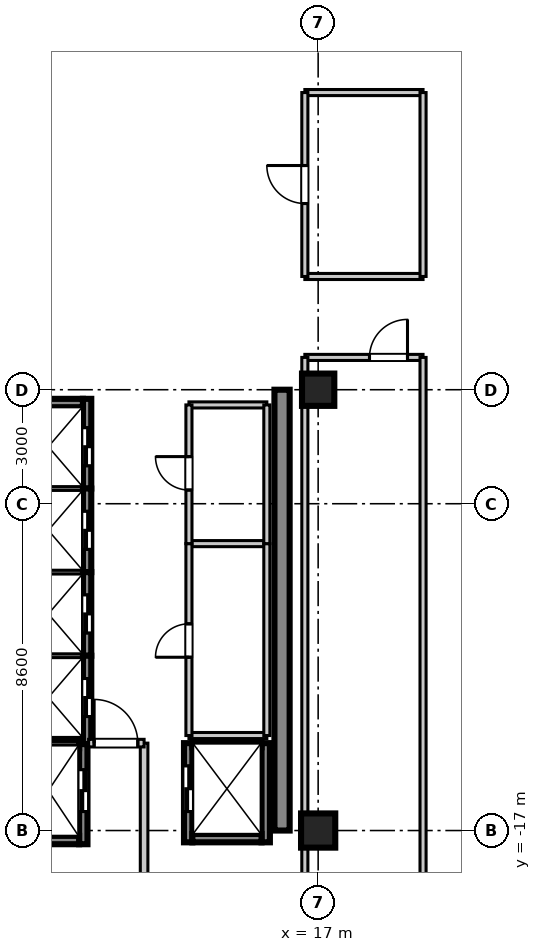
"""IFC4 building model, lengths in metres.
Left out: names, types, materials, properties, quantities, classifications, styles, units other than length and angle.
Written with IfcOpenShell. Run it as: python <this file> out.ifc"""

import sys

from ifc_helpers import new_model, si_unit, direction, frame, frame_2d, origin, origin_2d, place, context, subcontext, project, spatial, rectangle, extrude, source, transform, mapped, element, fill, save


model = new_model("IFC4")
c1 = context("Model", 3, precision=1e-05, world=origin(), true_north=direction((0.0, 1.0)))
c2 = subcontext(c1, "Body", "Model", "MODEL_VIEW")
j1 = project(units=[si_unit("LENGTHUNIT", "METRE"), si_unit("PLANEANGLEUNIT", "RADIAN")], contexts=[c1])
p1 = place(None, origin())
s1 = spatial("IfcSite", under=j1, at=p1, CompositionType="ELEMENT")
p2 = place(p1, origin())
s2 = spatial("IfcBuilding", under=s1, at=p2, CompositionType="ELEMENT")
p3 = place(p2, frame((0.0, 0.0, 281.3)))
s3 = spatial("IfcBuildingStorey", under=s2, at=p3, CompositionType="ELEMENT", Elevation=281.3)
m1 = source(origin(), c2, "Body", "SweptSolid", [
    extrude(rectangle(XDim=0.9, YDim=0.9, at=origin_2d()), origin(), (0.0, 0.0, 1.0), 3.705),
])
p4 = place(p3, frame((17.0, -17.0, 0.0), z_axis=(0.0, 0.0, 1.0), x_axis=(1.0, 0.0, 0.0)))
e1 = element("IfcColumn", 1, at=p4, inside=s3, PredefinedType="COLUMN", context=c2, shape_type="MappedRepresentation", body=[
    mapped(m1, transform((0.0, 0.0, 0.0), scale=1.0)),
])
m2 = source(origin(), c2, "Body", "SweptSolid", [
    extrude(rectangle(XDim=0.85, YDim=0.85, at=origin_2d()), origin(), (0.0, 0.0, 1.0), 3.705),
])
p5 = place(p3, frame((17.0, -5.4, 0.0), z_axis=(0.0, 0.0, 1.0), x_axis=(1.0, 0.0, 0.0)))
e2 = element("IfcColumn", 2, at=p5, inside=s3, PredefinedType="PILASTER", context=c2, shape_type="MappedRepresentation", body=[
    mapped(m2, transform((0.0, 0.0, 0.0), scale=1.0)),
])
m3 = source(origin(), c2, "Body", "SweptSolid", [
    extrude(rectangle(XDim=11.6, YDim=0.4, at=frame_2d((5.8, 0.0))), origin(), (0.0, 0.0, 1.0), 3.45),
])
p6 = place(p3, frame((16.05, -17.0, 0.0), z_axis=(0.0, 0.0, 1.0), x_axis=(0.0, 1.0, 0.0)))
e3 = element("IfcWall", 3, at=p6, inside=s3, PredefinedType="SHEAR", context=c2, shape_type="MappedRepresentation", body=[
    mapped(m3, transform((0.0, 0.0, 0.0), scale=1.0)),
])
m4 = source(origin(), c2, "Body", "SweptSolid", [
    extrude(rectangle(XDim=2.36, YDim=0.22, at=frame_2d((1.18, 0.0))), origin(), (0.0, 0.0, 1.0), 3.45),
])
p7 = place(p3, frame((10.92, -8.0, 0.0), z_axis=(0.0, 0.0, 1.0), x_axis=(0.0, 1.0, 0.0)))
e4 = element("IfcWall", 4, at=p7, inside=s3, PredefinedType="SHEAR", context=c2, shape_type="MappedRepresentation", body=[
    mapped(m4, transform((0.0, 0.0, 0.0), scale=1.0)),
])
p8 = place(p7, frame((0.6, 0.0, 0.0)))
e5 = element("IfcOpeningElement", 5, at=p8, cuts=e4, PredefinedType="OPENING", context=c2, shape_type="SweptSolid", body=[
    extrude(rectangle(XDim=1.0, YDim=2.2, at=frame_2d((0.5, 1.1))), frame((0.0, 0.12, 0.0), z_axis=(0.0, -1.0, 0.0), x_axis=(1.0, 0.0, 0.0)), (0.0, 0.0, 1.0), 0.24),
])
m5 = source(origin(), c2, "Body", "SweptSolid", [
    extrude(rectangle(XDim=1.82, YDim=0.22, at=frame_2d((0.91, 0.0))), origin(), (0.0, 0.0, 1.0), 3.45),
])
p9 = place(p3, frame((8.99, -5.75, 0.0), z_axis=(0.0, 0.0, 1.0), x_axis=(1.0, 0.0, 0.0)))
e6 = element("IfcWall", 6, at=p9, inside=s3, PredefinedType="SHEAR", context=c2, shape_type="MappedRepresentation", body=[
    mapped(m5, transform((0.0, 0.0, 0.0), scale=1.0)),
])
m6 = source(origin(), c2, "Body", "SweptSolid", [
    extrude(rectangle(XDim=2.2, YDim=0.22, at=frame_2d((1.1, 0.0))), origin(), (0.0, 0.0, 1.0), 3.45),
])
p10 = place(p3, frame((10.92, -10.2, 0.0), z_axis=(0.0, 0.0, 1.0), x_axis=(0.0, 1.0, 0.0)))
e7 = element("IfcWall", 7, at=p10, inside=s3, PredefinedType="SHEAR", context=c2, shape_type="MappedRepresentation", body=[
    mapped(m6, transform((0.0, 0.0, 0.0), scale=1.0)),
])
p11 = place(p10, frame((0.6, 0.0, 0.0)))
e8 = element("IfcOpeningElement", 8, at=p11, cuts=e7, PredefinedType="OPENING", context=c2, shape_type="SweptSolid", body=[
    extrude(rectangle(XDim=1.0, YDim=2.2, at=frame_2d((0.5, 1.1))), frame((0.0, 0.12, 0.0), z_axis=(0.0, -1.0, 0.0), x_axis=(1.0, 0.0, 0.0)), (0.0, 0.0, 1.0), 0.24),
])
m7 = source(origin(), c2, "Body", "SweptSolid", [
    extrude(rectangle(XDim=1.82, YDim=0.22, at=frame_2d((0.91, 0.0))), origin(), (0.0, 0.0, 1.0), 3.75),
])
p12 = place(p3, frame((8.99, -8.0, 0.0), z_axis=(0.0, 0.0, 1.0), x_axis=(1.0, 0.0, 0.0)))
e9 = element("IfcWall", 9, at=p12, inside=s3, PredefinedType="SHEAR", context=c2, shape_type="MappedRepresentation", body=[
    mapped(m7, transform((0.0, 0.0, 0.0), scale=1.0)),
])
p13 = place(p3, frame((10.92, -12.4, 0.0), z_axis=(0.0, 0.0, 1.0), x_axis=(0.0, 1.0, 0.0)))
e10 = element("IfcWall", 10, at=p13, inside=s3, PredefinedType="SHEAR", context=c2, shape_type="MappedRepresentation", body=[
    mapped(m6, transform((0.0, 0.0, 0.0), scale=1.0)),
])
p14 = place(p13, frame((0.6, 0.0, 0.0)))
e11 = element("IfcOpeningElement", 11, at=p14, cuts=e10, PredefinedType="OPENING", context=c2, shape_type="SweptSolid", body=[
    extrude(rectangle(XDim=1.0, YDim=2.2, at=frame_2d((0.5, 1.1))), frame((0.0, 0.12, 0.0), z_axis=(0.0, -1.0, 0.0), x_axis=(1.0, 0.0, 0.0)), (0.0, 0.0, 1.0), 0.24),
])
p15 = place(p3, frame((8.99, -10.2, 0.0), z_axis=(0.0, 0.0, 1.0), x_axis=(1.0, 0.0, 0.0)))
e12 = element("IfcWall", 12, at=p15, inside=s3, PredefinedType="SHEAR", context=c2, shape_type="MappedRepresentation", body=[
    mapped(m7, transform((0.0, 0.0, 0.0), scale=1.0)),
])
m8 = source(origin(), c2, "Body", "SweptSolid", [
    extrude(rectangle(XDim=2.325, YDim=0.22, at=frame_2d((1.163, 0.0))), origin(), (0.0, 0.0, 1.0), 3.45),
])
p16 = place(p3, frame((10.92, -14.725, 0.0), z_axis=(0.0, 0.0, 1.0), x_axis=(0.0, 1.0, 0.0)))
e13 = element("IfcWall", 13, at=p16, inside=s3, PredefinedType="SHEAR", context=c2, shape_type="MappedRepresentation", body=[
    mapped(m8, transform((0.0, 0.0, 0.0), scale=1.0)),
])
p17 = place(p16, frame((0.725, 0.0, 0.0)))
e14 = element("IfcOpeningElement", 14, at=p17, cuts=e13, PredefinedType="OPENING", context=c2, shape_type="SweptSolid", body=[
    extrude(rectangle(XDim=1.0, YDim=2.2, at=frame_2d((0.5, 1.1))), frame((0.0, 0.12, 0.0), z_axis=(0.0, -1.0, 0.0), x_axis=(1.0, 0.0, 0.0)), (0.0, 0.0, 1.0), 0.24),
])
p18 = place(p3, frame((8.99, -12.4, 0.0), z_axis=(0.0, 0.0, 1.0), x_axis=(1.0, 0.0, 0.0)))
e15 = element("IfcWall", 15, at=p18, inside=s3, PredefinedType="SHEAR", context=c2, shape_type="MappedRepresentation", body=[
    mapped(m7, transform((0.0, 0.0, 0.0), scale=1.0)),
])
m9 = source(origin(), c2, "Body", "SweptSolid", [
    extrude(rectangle(XDim=2.635, YDim=0.22, at=frame_2d((1.317, 0.0))), origin(), (0.0, 0.0, 1.0), 3.45),
])
p19 = place(p3, frame((10.82, -17.36, 0.0), z_axis=(0.0, 0.0, 1.0), x_axis=(0.0, 1.0, 0.0)))
e16 = element("IfcWall", 16, at=p19, inside=s3, PredefinedType="SHEAR", context=c2, shape_type="MappedRepresentation", body=[
    mapped(m9, transform((0.0, 0.0, 0.0), scale=1.0)),
])
p20 = place(p19, frame((0.86, 0.0, 0.0)))
e17 = element("IfcOpeningElement", 17, at=p20, cuts=e16, PredefinedType="OPENING", context=c2, shape_type="SweptSolid", body=[
    extrude(rectangle(XDim=1.1, YDim=2.2, at=frame_2d((0.55, 1.1))), frame((0.0, 0.12, 0.0), z_axis=(0.0, -1.0, 0.0), x_axis=(1.0, 0.0, 0.0)), (0.0, 0.0, 1.0), 0.24),
])
m10 = source(origin(), c2, "Body", "SweptSolid", [
    extrude(rectangle(XDim=1.62, YDim=0.22, at=frame_2d((0.81, 0.0))), origin(), (0.0, 0.0, 1.0), 3.45),
])
p21 = place(p3, frame((9.09, -17.25, 0.0), z_axis=(0.0, 0.0, 1.0), x_axis=(1.0, 0.0, 0.0)))
e18 = element("IfcWall", 18, at=p21, inside=s3, PredefinedType="SHEAR", context=c2, shape_type="MappedRepresentation", body=[
    mapped(m10, transform((0.0, 0.0, 0.0), scale=1.0)),
])
m11 = source(origin(), c2, "Body", "SweptSolid", [
    extrude(rectangle(XDim=1.62, YDim=0.22, at=frame_2d((0.81, 0.0))), origin(), (0.0, 0.0, 1.0), 3.75),
])
p22 = place(p3, frame((9.09, -14.725, 0.0), z_axis=(0.0, 0.0, 1.0), x_axis=(1.0, 0.0, 0.0)))
e19 = element("IfcWall", 19, at=p22, inside=s3, PredefinedType="SHEAR", context=c2, shape_type="MappedRepresentation", body=[
    mapped(m11, transform((0.0, 0.0, 0.0), scale=1.0)),
])
m12 = source(origin(), c2, "Body", "SweptSolid", [
    extrude(rectangle(XDim=2.61, YDim=0.22, at=frame_2d((1.305, 0.0))), origin(), (0.0, 0.0, 1.0), 3.45),
])
p23 = place(p3, frame((13.58, -17.31, 0.0), z_axis=(0.0, 0.0, 1.0), x_axis=(0.0, 1.0, 0.0)))
e20 = element("IfcWall", 20, at=p23, inside=s3, PredefinedType="SHEAR", context=c2, shape_type="MappedRepresentation", body=[
    mapped(m12, transform((0.0, 0.0, 0.0), scale=1.0)),
])
p24 = place(p23, frame((0.81, 0.0, 0.0)))
e21 = element("IfcOpeningElement", 21, at=p24, cuts=e20, PredefinedType="OPENING", context=c2, shape_type="SweptSolid", body=[
    extrude(rectangle(XDim=1.2, YDim=2.2, at=frame_2d((0.6, 1.1))), frame((0.0, 0.12, 0.0), z_axis=(0.0, -1.0, 0.0), x_axis=(1.0, 0.0, 0.0)), (0.0, 0.0, 1.0), 0.24),
])
p25 = place(p3, frame((15.62, -17.31, 0.0), z_axis=(0.0, 0.0, 1.0), x_axis=(0.0, 1.0, 0.0)))
e22 = element("IfcWall", 22, at=p25, inside=s3, PredefinedType="SHEAR", context=c2, shape_type="MappedRepresentation", body=[
    mapped(m12, transform((0.0, 0.0, 0.0), scale=1.0)),
])
p26 = place(p3, frame((13.69, -17.2, 0.0), z_axis=(0.0, 0.0, 1.0), x_axis=(1.0, 0.0, 0.0)))
e23 = element("IfcWall", 23, at=p26, inside=s3, PredefinedType="SHEAR", context=c2, shape_type="MappedRepresentation", body=[
    mapped(m5, transform((0.0, 0.0, 0.0), scale=1.0)),
])
p27 = place(p3, frame((13.69, -14.7, 0.0), z_axis=(0.0, 0.0, 1.0), x_axis=(1.0, 0.0, 0.0)))
e24 = element("IfcWall", 24, at=p27, inside=s3, PredefinedType="SHEAR", context=c2, shape_type="MappedRepresentation", body=[
    mapped(m7, transform((0.0, 0.0, 0.0), scale=1.0)),
])
m13 = source(origin(), c2, "Body", "SweptSolid", [
    extrude(rectangle(XDim=5.1, YDim=0.2, at=frame_2d((2.55, 0.0))), origin(), (0.0, 0.0, 1.0), 2.79),
])
p28 = place(p3, frame((12.42, -19.8, 0.0), z_axis=(0.0, 0.0, 1.0), x_axis=(0.0, 1.0, 0.0)))
e25 = element("IfcWall", 25, at=p28, inside=s3, PredefinedType="PARTITIONING", context=c2, shape_type="MappedRepresentation", body=[
    mapped(m13, transform((0.0, 0.0, 0.0), scale=1.0)),
])
m14 = source(origin(), c2, "Body", "SweptSolid", [
    extrude(rectangle(XDim=1.46, YDim=0.2, at=frame_2d((0.73, 0.0))), origin(), (0.0, 0.0, 1.0), 2.79),
])
p29 = place(p3, frame((10.96, -14.7, 0.0), z_axis=(0.0, 0.0, 1.0), x_axis=(1.0, 0.0, 0.0)))
e26 = element("IfcWall", 26, at=p29, inside=s3, PredefinedType="PARTITIONING", context=c2, shape_type="MappedRepresentation", body=[
    mapped(m14, transform((0.0, 0.0, 0.0), scale=1.0)),
])
p30 = place(p29, frame((0.145, 0.0, 0.0)))
e27 = element("IfcOpeningElement", 27, at=p30, cuts=e26, PredefinedType="OPENING", context=c2, shape_type="SweptSolid", body=[
    extrude(rectangle(XDim=1.15, YDim=2.15, at=frame_2d((0.575, 1.075))), frame((0.0, 0.11, 0.0), z_axis=(0.0, -1.0, 0.0), x_axis=(1.0, 0.0, 0.0)), (0.0, 0.0, 1.0), 0.22),
])
m15 = source(origin(), c2, "Body", "SweptSolid", [
    extrude(rectangle(XDim=2.05, YDim=0.16, at=frame_2d((1.025, 0.0))), origin(), (0.0, 0.0, 1.0), 2.79),
])
for number, where, z_axis, x_axis in (
    (28, (13.6, -14.5, 0.0), (0.0, 0.0, 1.0), (1.0, 0.0, 0.0)),
    (29, (13.6, -9.45, 0.0), (0.0, 0.0, 1.0), (1.0, 0.0, 0.0)),
):
    element("IfcWall", number, at=place(p3, frame(where, z_axis=z_axis, x_axis=x_axis)), inside=s3, PredefinedType="PARTITIONING", context=c2, shape_type="MappedRepresentation", body=[
        mapped(m15, transform((0.0, 0.0, 0.0), scale=1.0)),
    ])
m16 = source(origin(), c2, "Body", "SweptSolid", [
    extrude(rectangle(XDim=5.05, YDim=0.16, at=frame_2d((2.525, 0.0))), origin(), (0.0, 0.0, 1.0), 2.79),
])
p31 = place(p3, frame((13.6, -14.5, 0.0), z_axis=(0.0, 0.0, 1.0), x_axis=(0.0, 1.0, 0.0)))
e30 = element("IfcWall", 30, at=p31, inside=s3, PredefinedType="PARTITIONING", context=c2, shape_type="MappedRepresentation", body=[
    mapped(m16, transform((0.0, 0.0, 0.0), scale=1.0)),
])
p32 = place(p31, frame((2.06, 0.0, 0.0)))
e31 = element("IfcOpeningElement", 31, at=p32, cuts=e30, PredefinedType="OPENING", context=c2, shape_type="SweptSolid", body=[
    extrude(rectangle(XDim=0.88, YDim=2.1, at=frame_2d((0.44, 1.05))), frame((0.0, 0.09, 0.0), z_axis=(0.0, -1.0, 0.0), x_axis=(1.0, 0.0, 0.0)), (0.0, 0.0, 1.0), 0.18),
])
p33 = place(p3, frame((15.65, -14.5, 0.0), z_axis=(0.0, 0.0, 1.0), x_axis=(0.0, 1.0, 0.0)))
e32 = element("IfcWall", 32, at=p33, inside=s3, PredefinedType="PARTITIONING", context=c2, shape_type="MappedRepresentation", body=[
    mapped(m16, transform((0.0, 0.0, 0.0), scale=1.0)),
])
p34 = place(p3, frame((13.6, -5.8, 0.0), z_axis=(0.0, 0.0, 1.0), x_axis=(1.0, 0.0, 0.0)))
e33 = element("IfcWall", 33, at=p34, inside=s3, PredefinedType="PARTITIONING", context=c2, shape_type="MappedRepresentation", body=[
    mapped(m15, transform((0.0, 0.0, 0.0), scale=1.0)),
])
m17 = source(origin(), c2, "Body", "SweptSolid", [
    extrude(rectangle(XDim=3.65, YDim=0.16, at=frame_2d((1.825, 0.0))), origin(), (0.0, 0.0, 1.0), 2.79),
])
p35 = place(p3, frame((13.6, -9.45, 0.0), z_axis=(0.0, 0.0, 1.0), x_axis=(0.0, 1.0, 0.0)))
e34 = element("IfcWall", 34, at=p35, inside=s3, PredefinedType="PARTITIONING", context=c2, shape_type="MappedRepresentation", body=[
    mapped(m17, transform((0.0, 0.0, 0.0), scale=1.0)),
])
p36 = place(p35, frame((1.41, 0.0, 0.0)))
e35 = element("IfcOpeningElement", 35, at=p36, cuts=e34, PredefinedType="OPENING", context=c2, shape_type="SweptSolid", body=[
    extrude(rectangle(XDim=0.88, YDim=2.1, at=frame_2d((0.44, 1.05))), frame((0.0, 0.09, 0.0), z_axis=(0.0, -1.0, 0.0), x_axis=(1.0, 0.0, 0.0)), (0.0, 0.0, 1.0), 0.18),
])
p37 = place(p3, frame((15.65, -9.45, 0.0), z_axis=(0.0, 0.0, 1.0), x_axis=(0.0, 1.0, 0.0)))
e36 = element("IfcWall", 36, at=p37, inside=s3, PredefinedType="PARTITIONING", context=c2, shape_type="MappedRepresentation", body=[
    mapped(m17, transform((0.0, 0.0, 0.0), scale=1.0)),
])
m18 = source(origin(), c2, "Body", "SweptSolid", [
    extrude(rectangle(XDim=3.11, YDim=0.16, at=frame_2d((1.555, 0.0))), origin(), (0.0, 0.0, 1.0), 2.79),
])
p38 = place(p3, frame((16.65, -4.55, 0.0), z_axis=(0.0, 0.0, 1.0), x_axis=(1.0, 0.0, 0.0)))
e37 = element("IfcWall", 37, at=p38, inside=s3, PredefinedType="PARTITIONING", context=c2, shape_type="MappedRepresentation", body=[
    mapped(m18, transform((0.0, 0.0, 0.0), scale=1.0)),
])
p39 = place(p38, frame((1.701, 0.0, 0.0)))
e38 = element("IfcOpeningElement", 38, at=p39, cuts=e37, PredefinedType="OPENING", context=c2, shape_type="SweptSolid", body=[
    extrude(rectangle(XDim=1.0, YDim=2.1, at=frame_2d((0.5, 1.05))), frame((0.0, 0.09, 0.0), z_axis=(0.0, -1.0, 0.0), x_axis=(1.0, 0.0, 0.0)), (0.0, 0.0, 1.0), 0.18),
])
m19 = source(origin(), c2, "Body", "SweptSolid", [
    extrude(rectangle(XDim=17.95, YDim=0.16, at=frame_2d((8.975, 0.0))), origin(), (0.0, 0.0, 1.0), 2.79),
])
p40 = place(p3, frame((16.65, -22.5, 0.0), z_axis=(0.0, 0.0, 1.0), x_axis=(0.0, 1.0, 0.0)))
e39 = element("IfcWall", 39, at=p40, inside=s3, PredefinedType="PARTITIONING", context=c2, shape_type="MappedRepresentation", body=[
    mapped(m19, transform((0.0, 0.0, 0.0), scale=1.0)),
])
m20 = source(origin(), c2, "Body", "SweptSolid", [
    extrude(rectangle(XDim=16.53, YDim=0.16, at=frame_2d((8.265, 0.0))), origin(), (0.0, 0.0, 1.0), 2.79),
])
p41 = place(p3, frame((19.76, -21.08, 0.0), z_axis=(0.0, 0.0, 1.0), x_axis=(0.0, 1.0, 0.0)))
e40 = element("IfcWall", 40, at=p41, inside=s3, PredefinedType="PARTITIONING", context=c2, shape_type="MappedRepresentation", body=[
    mapped(m20, transform((0.0, 0.0, 0.0), scale=1.0)),
])
for number, where, z_axis, x_axis in (
    (41, (16.65, -2.42, 0.0), (0.0, 0.0, 1.0), (1.0, 0.0, 0.0)),
    (42, (16.65, 2.42, 0.0), (0.0, 0.0, 1.0), (1.0, 0.0, 0.0)),
):
    element("IfcWall", number, at=place(p3, frame(where, z_axis=z_axis, x_axis=x_axis)), inside=s3, PredefinedType="PARTITIONING", context=c2, shape_type="MappedRepresentation", body=[
        mapped(m18, transform((0.0, 0.0, 0.0), scale=1.0)),
    ])
m21 = source(origin(), c2, "Body", "SweptSolid", [
    extrude(rectangle(XDim=4.84, YDim=0.16, at=frame_2d((2.42, 0.0))), origin(), (0.0, 0.0, 1.0), 2.79),
])
p42 = place(p3, frame((16.65, -2.42, 0.0), z_axis=(0.0, 0.0, 1.0), x_axis=(0.0, 1.0, 0.0)))
e43 = element("IfcWall", 43, at=p42, inside=s3, PredefinedType="PARTITIONING", context=c2, shape_type="MappedRepresentation", body=[
    mapped(m21, transform((0.0, 0.0, 0.0), scale=1.0)),
])
p43 = place(p42, frame((1.92, 0.0, 0.0)))
e44 = element("IfcOpeningElement", 44, at=p43, cuts=e43, PredefinedType="OPENING", context=c2, shape_type="SweptSolid", body=[
    extrude(rectangle(XDim=1.0, YDim=2.1, at=frame_2d((0.5, 1.05))), frame((0.0, 0.09, 0.0), z_axis=(0.0, -1.0, 0.0), x_axis=(1.0, 0.0, 0.0)), (0.0, 0.0, 1.0), 0.18),
])
p44 = place(p3, frame((19.76, -2.42, 0.0), z_axis=(0.0, 0.0, 1.0), x_axis=(0.0, 1.0, 0.0)))
e45 = element("IfcWall", 45, at=p44, inside=s3, PredefinedType="PARTITIONING", context=c2, shape_type="MappedRepresentation", body=[
    mapped(m21, transform((0.0, 0.0, 0.0), scale=1.0)),
])
m22 = source(origin(), c2, "Body", "SweptSolid", [
    extrude(rectangle(XDim=1.0, YDim=2.2, at=frame_2d((0.5, 1.1))), frame((0.0, 0.025, 0.0), z_axis=(0.0, -1.0, 0.0), x_axis=(1.0, 0.0, 0.0)), (0.0, 0.0, 1.0), 0.05),
])
p45 = place(p8, frame((1.0, 0.0, 0.0), z_axis=(0.0, 0.0, 1.0), x_axis=(-1.0, 0.0, 0.0)))
e46 = element("IfcDoor", 46, at=p45, inside=s3, OperationType="DOUBLE_DOOR_SLIDING", PredefinedType="DOOR", context=c2, shape_type="MappedRepresentation", body=[
    mapped(m22, transform((0.0, 0.0, 0.0), scale=1.0)),
])
fill(e5, e46)
p46 = place(p11, frame((1.0, 0.0, 0.0), z_axis=(0.0, 0.0, 1.0), x_axis=(-1.0, 0.0, 0.0)))
e47 = element("IfcDoor", 47, at=p46, inside=s3, OperationType="DOUBLE_DOOR_SLIDING", PredefinedType="DOOR", context=c2, shape_type="MappedRepresentation", body=[
    mapped(m22, transform((0.0, 0.0, 0.0), scale=1.0)),
])
fill(e8, e47)
p47 = place(p14, frame((1.0, 0.0, 0.0), z_axis=(0.0, 0.0, 1.0), x_axis=(-1.0, 0.0, 0.0)))
e48 = element("IfcDoor", 48, at=p47, inside=s3, OperationType="DOUBLE_DOOR_SLIDING", PredefinedType="DOOR", context=c2, shape_type="MappedRepresentation", body=[
    mapped(m22, transform((0.0, 0.0, 0.0), scale=1.0)),
])
fill(e11, e48)
p48 = place(p17, frame((1.0, 0.0, 0.0), z_axis=(0.0, 0.0, 1.0), x_axis=(-1.0, 0.0, 0.0)))
e49 = element("IfcDoor", 49, at=p48, inside=s3, OperationType="DOUBLE_DOOR_SLIDING", PredefinedType="DOOR", context=c2, shape_type="MappedRepresentation", body=[
    mapped(m22, transform((0.0, 0.0, 0.0), scale=1.0)),
])
fill(e14, e49)
m23 = source(origin(), c2, "Body", "SweptSolid", [
    extrude(rectangle(XDim=1.1, YDim=2.2, at=frame_2d((0.55, 1.1))), frame((0.0, 0.025, 0.0), z_axis=(0.0, -1.0, 0.0), x_axis=(1.0, 0.0, 0.0)), (0.0, 0.0, 1.0), 0.05),
])
p49 = place(p20, frame((1.1, 0.0, 0.0), z_axis=(0.0, 0.0, 1.0), x_axis=(-1.0, 0.0, 0.0)))
e50 = element("IfcDoor", 50, at=p49, inside=s3, OperationType="DOUBLE_DOOR_SLIDING", PredefinedType="DOOR", context=c2, shape_type="MappedRepresentation", body=[
    mapped(m23, transform((0.0, 0.0, 0.0), scale=1.0)),
])
fill(e17, e50)
m24 = source(origin(), c2, "Body", "SweptSolid", [
    extrude(rectangle(XDim=1.2, YDim=2.2, at=frame_2d((0.6, 1.1))), frame((0.0, 0.025, 0.0), z_axis=(0.0, -1.0, 0.0), x_axis=(1.0, 0.0, 0.0)), (0.0, 0.0, 1.0), 0.05),
])
p50 = place(p24, origin())
e51 = element("IfcDoor", 51, at=p50, inside=s3, OperationType="DOUBLE_DOOR_SLIDING", PredefinedType="DOOR", context=c2, shape_type="MappedRepresentation", body=[
    mapped(m24, transform((0.0, 0.0, 0.0), scale=1.0)),
])
fill(e21, e51)
m25 = source(origin(), c2, "Body", "SweptSolid", [
    extrude(rectangle(XDim=1.15, YDim=2.15, at=frame_2d((0.575, 1.075))), frame((0.0, 0.025, 0.0), z_axis=(0.0, -1.0, 0.0), x_axis=(1.0, 0.0, 0.0)), (0.0, 0.0, 1.0), 0.05),
])
p51 = place(p30, origin())
e52 = element("IfcDoor", 52, at=p51, inside=s3, OperationType="SINGLE_SWING_LEFT", PredefinedType="DOOR", context=c2, shape_type="MappedRepresentation", body=[
    mapped(m25, transform((0.0, 0.0, 0.0), scale=1.0)),
])
fill(e27, e52)
m26 = source(origin(), c2, "Body", "SweptSolid", [
    extrude(rectangle(XDim=0.88, YDim=2.1, at=frame_2d((0.44, 1.05))), frame((0.0, 0.025, 0.0), z_axis=(0.0, -1.0, 0.0), x_axis=(1.0, 0.0, 0.0)), (0.0, 0.0, 1.0), 0.05),
])
p52 = place(p32, frame((0.88, 0.0, 0.0), z_axis=(0.0, 0.0, 1.0), x_axis=(-1.0, 0.0, 0.0)))
e53 = element("IfcDoor", 53, at=p52, inside=s3, OperationType="SINGLE_SWING_LEFT", PredefinedType="DOOR", context=c2, shape_type="MappedRepresentation", body=[
    mapped(m26, transform((0.0, 0.0, 0.0), scale=1.0)),
])
fill(e31, e53)
p53 = place(p36, frame((0.88, 0.0, 0.0), z_axis=(0.0, 0.0, 1.0), x_axis=(-1.0, 0.0, 0.0)))
e54 = element("IfcDoor", 54, at=p53, inside=s3, OperationType="SINGLE_SWING_RIGHT", PredefinedType="DOOR", context=c2, shape_type="MappedRepresentation", body=[
    mapped(m26, transform((0.0, 0.0, 0.0), scale=1.0)),
])
fill(e35, e54)
m27 = source(origin(), c2, "Body", "SweptSolid", [
    extrude(rectangle(XDim=1.0, YDim=2.1, at=frame_2d((0.5, 1.05))), frame((0.0, 0.025, 0.0), z_axis=(0.0, -1.0, 0.0), x_axis=(1.0, 0.0, 0.0)), (0.0, 0.0, 1.0), 0.05),
])
p54 = place(p39, frame((1.0, 0.0, 0.0), z_axis=(0.0, 0.0, 1.0), x_axis=(-1.0, 0.0, 0.0)))
e55 = element("IfcDoor", 55, at=p54, inside=s3, OperationType="SINGLE_SWING_RIGHT", PredefinedType="DOOR", context=c2, shape_type="MappedRepresentation", body=[
    mapped(m27, transform((0.0, 0.0, 0.0), scale=1.0)),
])
fill(e38, e55)
p55 = place(p43, frame((1.0, 0.0, 0.0), z_axis=(0.0, 0.0, 1.0), x_axis=(-1.0, 0.0, 0.0)))
e56 = element("IfcDoor", 56, at=p55, inside=s3, OperationType="SINGLE_SWING_RIGHT", PredefinedType="DOOR", context=c2, shape_type="MappedRepresentation", body=[
    mapped(m27, transform((0.0, 0.0, 0.0), scale=1.0)),
])
fill(e44, e56)
save(model, sys.argv[1])
